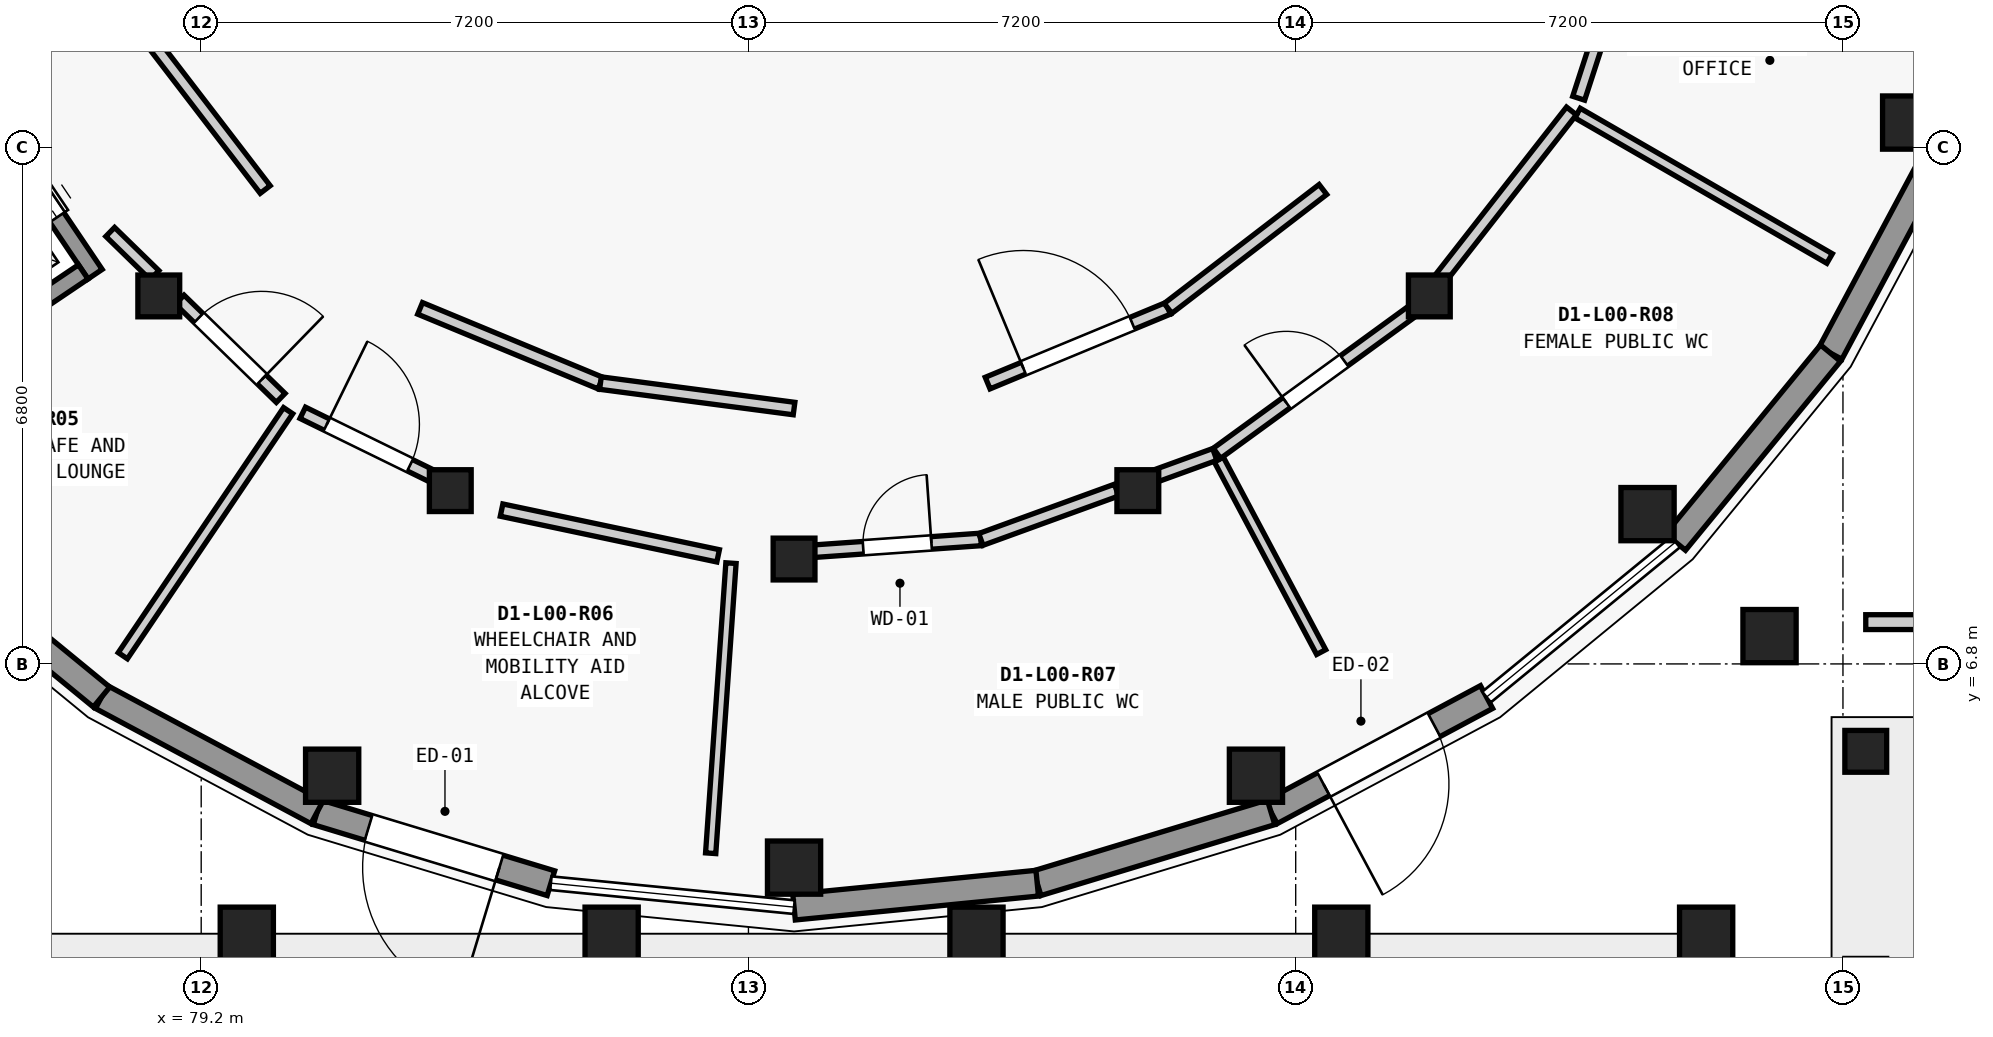
"""IFC4 building model, lengths in metres.
Left out: names, types, materials, properties, quantities, classifications, styles, units other than length and angle.
Written with IfcOpenShell. Run it as: python <this file> out.ifc"""

import sys

from ifc_helpers import new_model, si_unit, direction, frame, frame_2d, origin, origin_2d, place, context, subcontext, project, spatial, rectangle, circle, extrude, element, fill, save


model = new_model("IFC4")
c1 = context("Model", 3, precision=1e-05, world=origin(), true_north=direction((0.0, 1.0)))
c2 = subcontext(c1, "Body", "Model", "MODEL_VIEW")
j1 = project(units=[si_unit("LENGTHUNIT", "METRE"), si_unit("PLANEANGLEUNIT", "RADIAN")], contexts=[c1])
p1 = place(None, origin())
s1 = spatial("IfcSite", under=j1, at=p1, CompositionType="ELEMENT")
p2 = place(p1, origin())
s2 = spatial("IfcBuilding", under=s1, at=p2, CompositionType="ELEMENT")
p3 = place(p2, origin())
s3 = spatial("IfcBuildingStorey", under=s2, at=p3, CompositionType="ELEMENT", Elevation=0.0)
for number, where, z_axis, x_axis in (
    (1, (80.923, 5.329, 0.0), (0.0, 0.0, 1.0), (1.0, 0.0, 0.0)),
    (2, (87.0, 4.12, 0.0), (0.0, 0.0, 1.0), (1.0, 0.0, 0.0)),
    (3, (93.077, 5.329, 0.0), (0.0, 0.0, 1.0), (1.0, 0.0, 0.0)),
    (4, (98.229, 8.771, 0.0), (0.0, 0.0, 1.0), (1.0, 0.0, 0.0)),
    (5, (101.671, 13.923, 0.0), (0.0, 0.0, 1.0), (1.0, 0.0, 0.0)),
):
    element("IfcColumn", number, at=place(p3, frame(where, z_axis=z_axis, x_axis=x_axis)), inside=s3, PredefinedType="COLUMN", context=c2, shape_type="SweptSolid", body=[
        extrude(circle(Radius=0.35, at=origin_2d()), origin(), (0.0, 0.0, 1.0), 4.55),
    ])
for number, where, z_axis, x_axis in (
    (6, (78.642, 11.642, 0.0), (0.0, 0.0, 1.0), (1.0, 0.0, 0.0)),
    (7, (82.477, 9.08, 0.0), (0.0, 0.0, 1.0), (1.0, 0.0, 0.0)),
    (8, (87.0, 8.18, 0.0), (0.0, 0.0, 1.0), (1.0, 0.0, 0.0)),
    (9, (91.523, 9.08, 0.0), (0.0, 0.0, 1.0), (1.0, 0.0, 0.0)),
    (10, (95.358, 11.642, 0.0), (0.0, 0.0, 1.0), (1.0, 0.0, 0.0)),
):
    element("IfcColumn", number, at=place(p3, frame(where, z_axis=z_axis, x_axis=x_axis)), inside=s3, PredefinedType="COLUMN", context=c2, shape_type="SweptSolid", body=[
        extrude(rectangle(XDim=0.55, YDim=0.55, at=origin_2d()), origin(), (0.0, 0.0, 1.0), 4.55),
    ])
for number, where, z_axis, x_axis in (
    (11, (79.8, 3.25, 0.0), (0.0, 0.0, 1.0), (1.0, 0.0, 0.0)),
    (12, (84.6, 3.25, 0.0), (0.0, 0.0, 1.0), (1.0, 0.0, 0.0)),
    (13, (89.4, 3.25, 0.0), (0.0, 0.0, 1.0), (1.0, 0.0, 0.0)),
    (14, (94.2, 3.25, 0.0), (0.0, 0.0, 1.0), (1.0, 0.0, 0.0)),
    (15, (99.0, 3.25, 0.0), (0.0, 0.0, 1.0), (1.0, 0.0, 0.0)),
):
    element("IfcColumn", number, at=place(p3, frame(where, z_axis=z_axis, x_axis=x_axis)), inside=s3, PredefinedType="COLUMN", context=c2, shape_type="SweptSolid", body=[
        extrude(circle(Radius=0.35, at=origin_2d()), origin(), (0.0, 0.0, 1.0), 4.55),
    ])
p4 = place(p3, frame((101.1, 5.65, 0.0), z_axis=(0.0, 0.0, 1.0), x_axis=(1.0, 0.0, 0.0)))
e16 = element("IfcColumn", 16, at=p4, inside=s3, PredefinedType="PILASTER", context=c2, shape_type="SweptSolid", body=[
    extrude(circle(Radius=0.275, at=origin_2d()), origin(), (0.0, 0.0, 1.0), 4.55),
])
p5 = place(p3, frame((99.834, 7.166, 0.0), z_axis=(0.0, 0.0, 1.0), x_axis=(1.0, 0.0, 0.0)))
e17 = element("IfcColumn", 17, at=p5, inside=s3, PredefinedType="COLUMN", context=c2, shape_type="SweptSolid", body=[
    extrude(circle(Radius=0.35, at=origin_2d()), origin(), (0.0, 0.0, 1.0), 4.55),
])
for number, where, z_axis, x_axis in (
    (18, (102.152, 13.724, 0.0), (0.0, 0.0, 1.0), (-0.472, -0.882, 0.0)),
    (19, (100.636, 10.889, 0.0), (0.0, 0.0, 1.0), (-0.634, -0.773, 0.0)),
):
    element("IfcWall", number, at=place(p3, frame(where, z_axis=z_axis, x_axis=x_axis)), inside=s3, PredefinedType="SOLIDWALL", context=c2, shape_type="SweptSolid", body=[
        extrude(rectangle(XDim=3.215, YDim=0.34, at=frame_2d((1.607, 0.0))), origin(), (0.0, 0.0, 1.0), 3.659),
    ])
p6 = place(p3, frame((96.111, 6.364, 0.0), z_axis=(0.0, 0.0, 1.0), x_axis=(-0.881835313523, -0.47155750426, 0.0)))
e20 = element("IfcWall", 20, at=p6, inside=s3, PredefinedType="SOLIDWALL", context=c2, shape_type="SweptSolid", body=[
    extrude(rectangle(XDim=3.215, YDim=0.34, at=frame_2d((1.607, 0.0))), origin(), (0.0, 0.0, 1.0), 3.659),
])
p7 = place(p6, frame((0.782, 0.0, 0.0)))
e21 = element("IfcOpeningElement", 21, at=p7, cuts=e20, PredefinedType="OPENING", context=c2, shape_type="SweptSolid", body=[
    extrude(rectangle(XDim=1.65, YDim=2.45, at=frame_2d((0.825, 1.225))), frame((0.0, 0.18, 0.0), z_axis=(0.0, -1.0, 0.0), x_axis=(1.0, 0.0, 0.0)), (0.0, 0.0, 1.0), 0.36),
])
p8 = place(p3, frame((93.276, 4.848, 0.0), z_axis=(0.0, 0.0, 1.0), x_axis=(-0.956984161567, -0.29014016356, 0.0)))
e22 = element("IfcWall", 22, at=p8, inside=s3, PredefinedType="SOLIDWALL", context=c2, shape_type="SweptSolid", body=[
    extrude(rectangle(XDim=3.215, YDim=0.34, at=frame_2d((1.607, 0.0))), origin(), (0.0, 0.0, 1.0), 3.659),
])
p9 = place(p3, frame((90.199, 3.915, 0.0), z_axis=(0.0, 0.0, 1.0), x_axis=(-0.995188673637, -0.097977057849, 0.0)))
e23 = element("IfcWall", 23, at=p9, inside=s3, PredefinedType="SOLIDWALL", context=c2, shape_type="SweptSolid", body=[
    extrude(rectangle(XDim=3.214, YDim=0.34, at=frame_2d((1.607, 0.0))), origin(), (0.0, 0.0, 1.0), 3.659),
])
p10 = place(p3, frame((83.801, 3.915, 0.0), z_axis=(0.0, 0.0, 1.0), x_axis=(-0.956984161567, 0.29014016356, 0.0)))
e24 = element("IfcWall", 24, at=p10, inside=s3, PredefinedType="SOLIDWALL", context=c2, shape_type="SweptSolid", body=[
    extrude(rectangle(XDim=3.215, YDim=0.34, at=frame_2d((1.607, 0.0))), origin(), (0.0, 0.0, 1.0), 3.659),
])
p11 = place(p10, frame((0.708, 0.0, 0.0)))
e25 = element("IfcOpeningElement", 25, at=p11, cuts=e24, PredefinedType="OPENING", context=c2, shape_type="SweptSolid", body=[
    extrude(rectangle(XDim=1.8, YDim=2.55, at=frame_2d((0.9, 1.275))), frame((0.0, 0.18, 0.0), z_axis=(0.0, -1.0, 0.0), x_axis=(1.0, 0.0, 0.0)), (0.0, 0.0, 1.0), 0.36),
])
for number, where, z_axis, x_axis in (
    (26, (80.724, 4.848, 0.0), (0.0, 0.0, 1.0), (-0.882, 0.472, 0.0)),
    (27, (77.889, 6.364, 0.0), (0.0, 0.0, 1.0), (-0.773, 0.634, 0.0)),
):
    element("IfcWall", number, at=place(p3, frame(where, z_axis=z_axis, x_axis=x_axis)), inside=s3, PredefinedType="SOLIDWALL", context=c2, shape_type="SweptSolid", body=[
        extrude(rectangle(XDim=3.215, YDim=0.34, at=frame_2d((1.607, 0.0))), origin(), (0.0, 0.0, 1.0), 3.659),
    ])
p12 = place(p3, frame((115.5, 7.35, 0.0), z_axis=(0.0, 0.0, 1.0), x_axis=(-1.0, 0.0, 0.0)))
e28 = element("IfcWall", 28, at=p12, inside=s3, PredefinedType="PARAPET", context=c2, shape_type="SweptSolid", body=[
    extrude(rectangle(XDim=14.4, YDim=0.195, at=frame_2d((7.2, 0.0))), origin(), (0.0, 0.0, 1.0), 2.37),
])
p13 = place(p12, frame((6.525, 0.0, 0.0)))
e29 = element("IfcOpeningElement", 29, at=p13, cuts=e28, PredefinedType="OPENING", context=c2, shape_type="SweptSolid", body=[
    extrude(rectangle(XDim=1.35, YDim=2.05, at=frame_2d((0.675, 1.025))), frame((0.0, 0.107, 0.0), z_axis=(0.0, -1.0, 0.0), x_axis=(1.0, 0.0, 0.0)), (0.0, 0.0, 1.0), 0.215),
])
p14 = place(p3, frame((77.804, 11.928, 0.0), z_axis=(0.0, 0.0, 1.0), x_axis=(-0.559054792443, 0.829130712883, 0.0)))
e30 = element("IfcWall", 30, at=p14, inside=s3, PredefinedType="SHEAR", context=c2, shape_type="SweptSolid", body=[
    extrude(rectangle(XDim=3.1, YDim=0.225, at=frame_2d((1.55, 0.0))), origin(), (0.0, 0.0, 1.0), 4.305),
])
p15 = place(p14, frame((0.9, 0.0, 0.0)))
e31 = element("IfcOpeningElement", 31, at=p15, cuts=e30, PredefinedType="OPENING", context=c2, shape_type="SweptSolid", body=[
    extrude(rectangle(XDim=1.3, YDim=2.2, at=frame_2d((0.65, 1.1))), frame((0.0, 0.123, 0.0), z_axis=(0.0, -1.0, 0.0), x_axis=(1.0, 0.0, 0.0)), (0.0, 0.0, 1.0), 0.245),
])
p16 = place(p3, frame((77.648, 11.958, 0.0), z_axis=(0.0, 0.0, 1.0), x_axis=(-0.829050086962, -0.559174349652, 0.0)))
e32 = element("IfcWall", 32, at=p16, inside=s3, PredefinedType="SHEAR", context=c2, shape_type="SweptSolid", body=[
    extrude(rectangle(XDim=2.149, YDim=0.225, at=frame_2d((1.075, 0.0))), origin(), (0.0, 0.0, 1.0), 4.305),
])
p17 = place(p3, frame((78.478, 15.08, 0.0), z_axis=(0.0, 0.0, 1.0), x_axis=(0.608782621434, -0.793337078322, 0.0)))
e33 = element("IfcWall", 33, at=p17, inside=s3, PredefinedType="PARTITIONING", context=c2, shape_type="SweptSolid", body=[
    extrude(rectangle(XDim=2.569, YDim=0.165, at=frame_2d((1.285, 0.0))), origin(), (0.0, 0.0, 1.0), 3.634),
])
p18 = place(p3, frame((82.08, 11.478, 0.0), z_axis=(0.0, 0.0, 1.0), x_axis=(0.923870848353, -0.382704397106, 0.0)))
e34 = element("IfcWall", 34, at=p18, inside=s3, PredefinedType="PARTITIONING", context=c2, shape_type="SweptSolid", body=[
    extrude(rectangle(XDim=2.568, YDim=0.165, at=frame_2d((1.284, 0.0))), origin(), (0.0, 0.0, 1.0), 3.634),
])
p19 = place(p3, frame((84.453, 10.495, 0.0), z_axis=(0.0, 0.0, 1.0), x_axis=(0.991451384224, -0.130476636685, 0.0)))
e35 = element("IfcWall", 35, at=p19, inside=s3, PredefinedType="PARTITIONING", context=c2, shape_type="SweptSolid", body=[
    extrude(rectangle(XDim=2.569, YDim=0.165, at=frame_2d((1.285, 0.0))), origin(), (0.0, 0.0, 1.0), 3.634),
])
p20 = place(p3, frame((89.547, 10.495, 0.0), z_axis=(0.0, 0.0, 1.0), x_axis=(0.923870848353, 0.382704397106, 0.0)))
e36 = element("IfcWall", 36, at=p20, inside=s3, PredefinedType="PARTITIONING", context=c2, shape_type="SweptSolid", body=[
    extrude(rectangle(XDim=2.568, YDim=0.165, at=frame_2d((1.284, 0.0))), origin(), (0.0, 0.0, 1.0), 3.634),
])
p21 = place(p20, frame((0.509, 0.0, 0.0)))
e37 = element("IfcOpeningElement", 37, at=p21, cuts=e36, PredefinedType="OPENING", context=c2, shape_type="SweptSolid", body=[
    extrude(rectangle(XDim=1.55, YDim=2.35, at=frame_2d((0.775, 1.175))), frame((0.0, 0.093, 0.0), z_axis=(0.0, -1.0, 0.0), x_axis=(1.0, 0.0, 0.0)), (0.0, 0.0, 1.0), 0.185),
])
p22 = place(p3, frame((91.92, 11.478, 0.0), z_axis=(0.0, 0.0, 1.0), x_axis=(0.793337078322, 0.608782621434, 0.0)))
e38 = element("IfcWall", 38, at=p22, inside=s3, PredefinedType="PARTITIONING", context=c2, shape_type="SweptSolid", body=[
    extrude(rectangle(XDim=2.569, YDim=0.165, at=frame_2d((1.285, 0.0))), origin(), (0.0, 0.0, 1.0), 3.634),
])
p23 = place(p3, frame((80.344, 10.132, 0.0), z_axis=(0.0, 0.0, 1.0), x_axis=(-0.559255053263, -0.828995648601, 0.0)))
e39 = element("IfcWall", 39, at=p23, inside=s3, PredefinedType="PARTITIONING", context=c2, shape_type="SweptSolid", body=[
    extrude(rectangle(XDim=3.889, YDim=0.145, at=frame_2d((1.945, 0.0))), origin(), (0.0, 0.0, 1.0), 3.634),
])
p24 = place(p3, frame((86.17, 8.126, 0.0), z_axis=(0.0, 0.0, 1.0), x_axis=(-0.069741502562, -0.997565097034, 0.0)))
e40 = element("IfcWall", 40, at=p24, inside=s3, PredefinedType="PLUMBINGWALL", context=c2, shape_type="SweptSolid", body=[
    extrude(rectangle(XDim=3.826, YDim=0.135, at=frame_2d((1.913, 0.0))), origin(), (0.0, 0.0, 1.0), 3.634),
])
p25 = place(p3, frame((92.588, 9.49, 0.0), z_axis=(0.0, 0.0, 1.0), x_axis=(0.469430960331, -0.88296918037, 0.0)))
e41 = element("IfcWall", 41, at=p25, inside=s3, PredefinedType="PLUMBINGWALL", context=c2, shape_type="SweptSolid", body=[
    extrude(rectangle(XDim=2.87, YDim=0.135, at=frame_2d((1.435, 0.0))), origin(), (0.0, 0.0, 1.0), 3.634),
])
p26 = place(p3, frame((97.308, 14.048, 0.0), z_axis=(0.0, 0.0, 1.0), x_axis=(0.866068787954, -0.499924848885, 0.0)))
e42 = element("IfcWall", 42, at=p26, inside=s3, PredefinedType="PARTITIONING", context=c2, shape_type="SweptSolid", body=[
    extrude(rectangle(XDim=3.829, YDim=0.145, at=frame_2d((1.914, 0.0))), origin(), (0.0, 0.0, 1.0), 3.634),
])
p27 = place(p3, frame((78.003, 12.484, 0.0), z_axis=(0.0, 0.0, 1.0), x_axis=(0.716344915194, -0.697746345369, 0.0)))
e43 = element("IfcWall", 43, at=p27, inside=s3, PredefinedType="PARTITIONING", context=c2, shape_type="SweptSolid", body=[
    extrude(rectangle(XDim=0.814, YDim=0.165, at=frame_2d((0.407, 0.0))), origin(), (0.0, 0.0, 1.0), 3.634),
])
p28 = place(p3, frame((78.917, 11.593, 0.0), z_axis=(0.0, 0.0, 1.0), x_axis=(0.716782843261, -0.697296461777, 0.0)))
e44 = element("IfcWall", 44, at=p28, inside=s3, PredefinedType="PARTITIONING", context=c2, shape_type="SweptSolid", body=[
    extrude(rectangle(XDim=1.854, YDim=0.165, at=frame_2d((0.927, 0.0))), origin(), (0.0, 0.0, 1.0), 3.634),
])
p29 = place(p28, frame((0.347, 0.0, 0.0)))
e45 = element("IfcOpeningElement", 45, at=p29, cuts=e44, PredefinedType="OPENING", context=c2, shape_type="SweptSolid", body=[
    extrude(rectangle(XDim=1.16, YDim=2.18, at=frame_2d((0.58, 1.09))), frame((0.0, 0.093, 0.0), z_axis=(0.0, -1.0, 0.0), x_axis=(1.0, 0.0, 0.0)), (0.0, 0.0, 1.0), 0.185),
])
p30 = place(p3, frame((80.536, 10.104, 0.0), z_axis=(0.0, 0.0, 1.0), x_axis=(0.898155885725, -0.4396771599, 0.0)))
e46 = element("IfcWall", 46, at=p30, inside=s3, PredefinedType="PARTITIONING", context=c2, shape_type="SweptSolid", body=[
    extrude(rectangle(XDim=1.922, YDim=0.165, at=frame_2d((0.961, 0.0))), origin(), (0.0, 0.0, 1.0), 3.634),
])
p31 = place(p30, frame((0.351, 0.0, 0.0)))
e47 = element("IfcOpeningElement", 47, at=p31, cuts=e46, PredefinedType="OPENING", context=c2, shape_type="SweptSolid", body=[
    extrude(rectangle(XDim=1.22, YDim=2.18, at=frame_2d((0.61, 1.09))), frame((0.0, 0.093, 0.0), z_axis=(0.0, -1.0, 0.0), x_axis=(1.0, 0.0, 0.0)), (0.0, 0.0, 1.0), 0.185),
])
p32 = place(p3, frame((83.152, 8.824, 0.0), z_axis=(0.0, 0.0, 1.0), x_axis=(0.978391146113, -0.206762581739, 0.0)))
e48 = element("IfcWall", 48, at=p32, inside=s3, PredefinedType="PARTITIONING", context=c2, shape_type="SweptSolid", body=[
    extrude(rectangle(XDim=2.912, YDim=0.165, at=frame_2d((1.456, 0.0))), origin(), (0.0, 0.0, 1.0), 3.634),
])
p33 = place(p3, frame((87.26, 8.283, 0.0), z_axis=(0.0, 0.0, 1.0), x_axis=(0.997521857639, 0.070357256426, 0.0)))
e49 = element("IfcWall", 49, at=p33, inside=s3, PredefinedType="PARTITIONING", context=c2, shape_type="SweptSolid", body=[
    extrude(rectangle(XDim=2.203, YDim=0.165, at=frame_2d((1.102, 0.0))), origin(), (0.0, 0.0, 1.0), 3.634),
])
p34 = place(p33, frame((0.651, 0.0, 0.0)))
e50 = element("IfcOpeningElement", 50, at=p34, cuts=e49, PredefinedType="OPENING", context=c2, shape_type="SweptSolid", body=[
    extrude(rectangle(XDim=0.9, YDim=2.1, at=frame_2d((0.45, 1.05))), frame((0.0, 0.093, 0.0), z_axis=(0.0, -1.0, 0.0), x_axis=(1.0, 0.0, 0.0)), (0.0, 0.0, 1.0), 0.185),
])
p35 = place(p3, frame((89.458, 8.438, 0.0), z_axis=(0.0, 0.0, 1.0), x_axis=(0.939815940842, 0.341681134011, 0.0)))
e51 = element("IfcWall", 51, at=p35, inside=s3, PredefinedType="PARTITIONING", context=c2, shape_type="SweptSolid", body=[
    extrude(rectangle(XDim=1.899, YDim=0.165, at=frame_2d((0.95, 0.0))), origin(), (0.0, 0.0, 1.0), 3.634),
])
p36 = place(p3, frame((91.733, 9.265, 0.0), z_axis=(0.0, 0.0, 1.0), x_axis=(0.94002714221, 0.341099650994, 0.0)))
e52 = element("IfcWall", 52, at=p36, inside=s3, PredefinedType="PARTITIONING", context=c2, shape_type="SweptSolid", body=[
    extrude(rectangle(XDim=0.853, YDim=0.165, at=frame_2d((0.427, 0.0))), origin(), (0.0, 0.0, 1.0), 3.634),
])
p37 = place(p3, frame((92.564, 9.571, 0.0), z_axis=(0.0, 0.0, 1.0), x_axis=(0.808488549055, 0.58851190816, 0.0)))
e53 = element("IfcWall", 53, at=p37, inside=s3, PredefinedType="PARTITIONING", context=c2, shape_type="SweptSolid", body=[
    extrude(rectangle(XDim=3.2, YDim=0.165, at=frame_2d((1.6, 0.0))), origin(), (0.0, 0.0, 1.0), 3.634),
])
p38 = place(p37, frame((1.13, 0.0, 0.0)))
e54 = element("IfcOpeningElement", 54, at=p38, cuts=e53, PredefinedType="OPENING", context=c2, shape_type="SweptSolid", body=[
    extrude(rectangle(XDim=0.94, YDim=2.1, at=frame_2d((0.47, 1.05))), frame((0.0, 0.093, 0.0), z_axis=(0.0, -1.0, 0.0), x_axis=(1.0, 0.0, 0.0)), (0.0, 0.0, 1.0), 0.185),
])
p39 = place(p3, frame((95.509, 11.878, 0.0), z_axis=(0.0, 0.0, 1.0), x_axis=(0.616046360546, 0.787709896889, 0.0)))
e55 = element("IfcWall", 55, at=p39, inside=s3, PredefinedType="PARTITIONING", context=c2, shape_type="SweptSolid", body=[
    extrude(rectangle(XDim=2.79, YDim=0.165, at=frame_2d((1.395, 0.0))), origin(), (0.0, 0.0, 1.0), 3.634),
])
p40 = place(p3, frame((97.323, 14.243, 0.0), z_axis=(0.0, 0.0, 1.0), x_axis=(0.308889116513, 0.951098056827, 0.0)))
e56 = element("IfcWall", 56, at=p40, inside=s3, PredefinedType="PARTITIONING", context=c2, shape_type="SweptSolid", body=[
    extrude(rectangle(XDim=1.149, YDim=0.165, at=frame_2d((0.575, 0.0))), origin(), (0.0, 0.0, 1.0), 3.634),
])
p41 = place(p7, origin())
e57 = element("IfcDoor", 57, at=p41, inside=s3, OperationType="SINGLE_SWING_RIGHT", PredefinedType="DOOR", context=c2, shape_type="SweptSolid", body=[
    extrude(rectangle(XDim=1.65, YDim=2.45, at=frame_2d((0.825, 1.225))), frame((0.0, 0.025, 0.0), z_axis=(0.0, -1.0, 0.0), x_axis=(1.0, 0.0, 0.0)), (0.0, 0.0, 1.0), 0.05),
])
fill(e21, e57)
p42 = place(p11, origin())
e58 = element("IfcDoor", 58, at=p42, inside=s3, OperationType="SINGLE_SWING_LEFT", PredefinedType="DOOR", context=c2, shape_type="SweptSolid", body=[
    extrude(rectangle(XDim=1.8, YDim=2.55, at=frame_2d((0.9, 1.275))), frame((0.0, 0.025, 0.0), z_axis=(0.0, -1.0, 0.0), x_axis=(1.0, 0.0, 0.0)), (0.0, 0.0, 1.0), 0.05),
])
fill(e25, e58)
p43 = place(p15, origin())
e59 = element("IfcDoor", 59, at=p43, inside=s3, OperationType="DOUBLE_DOOR_SLIDING", PredefinedType="DOOR", context=c2, shape_type="SweptSolid", body=[
    extrude(rectangle(XDim=1.3, YDim=2.2, at=frame_2d((0.65, 1.1))), frame((0.0, 0.025, 0.0), z_axis=(0.0, -1.0, 0.0), x_axis=(1.0, 0.0, 0.0)), (0.0, 0.0, 1.0), 0.05),
])
fill(e31, e59)
p44 = place(p21, origin())
e60 = element("IfcDoor", 60, at=p44, inside=s3, OperationType="SINGLE_SWING_LEFT", PredefinedType="DOOR", context=c2, shape_type="SweptSolid", body=[
    extrude(rectangle(XDim=1.55, YDim=2.35, at=frame_2d((0.775, 1.175))), frame((0.0, 0.025, 0.0), z_axis=(0.0, -1.0, 0.0), x_axis=(1.0, 0.0, 0.0)), (0.0, 0.0, 1.0), 0.05),
])
fill(e37, e60)
p45 = place(p29, origin())
e61 = element("IfcDoor", 61, at=p45, inside=s3, OperationType="SINGLE_SWING_RIGHT", PredefinedType="DOOR", context=c2, shape_type="SweptSolid", body=[
    extrude(rectangle(XDim=1.16, YDim=2.18, at=frame_2d((0.58, 1.09))), frame((0.0, 0.025, 0.0), z_axis=(0.0, -1.0, 0.0), x_axis=(1.0, 0.0, 0.0)), (0.0, 0.0, 1.0), 0.05),
])
fill(e45, e61)
p46 = place(p31, origin())
e62 = element("IfcDoor", 62, at=p46, inside=s3, OperationType="SINGLE_SWING_LEFT", PredefinedType="DOOR", context=c2, shape_type="SweptSolid", body=[
    extrude(rectangle(XDim=1.22, YDim=2.18, at=frame_2d((0.61, 1.09))), frame((0.0, 0.025, 0.0), z_axis=(0.0, -1.0, 0.0), x_axis=(1.0, 0.0, 0.0)), (0.0, 0.0, 1.0), 0.05),
])
fill(e47, e62)
p47 = place(p34, origin())
e63 = element("IfcDoor", 63, at=p47, inside=s3, OperationType="SINGLE_SWING_RIGHT", PredefinedType="DOOR", context=c2, shape_type="SweptSolid", body=[
    extrude(rectangle(XDim=0.9, YDim=2.1, at=frame_2d((0.45, 1.05))), frame((0.0, 0.025, 0.0), z_axis=(0.0, -1.0, 0.0), x_axis=(1.0, 0.0, 0.0)), (0.0, 0.0, 1.0), 0.05),
])
fill(e50, e63)
p48 = place(p38, origin())
e64 = element("IfcDoor", 64, at=p48, inside=s3, OperationType="SINGLE_SWING_LEFT", PredefinedType="DOOR", context=c2, shape_type="SweptSolid", body=[
    extrude(rectangle(XDim=0.94, YDim=2.1, at=frame_2d((0.47, 1.05))), frame((0.0, 0.025, 0.0), z_axis=(0.0, -1.0, 0.0), x_axis=(1.0, 0.0, 0.0)), (0.0, 0.0, 1.0), 0.05),
])
fill(e54, e64)
save(model, sys.argv[1])
